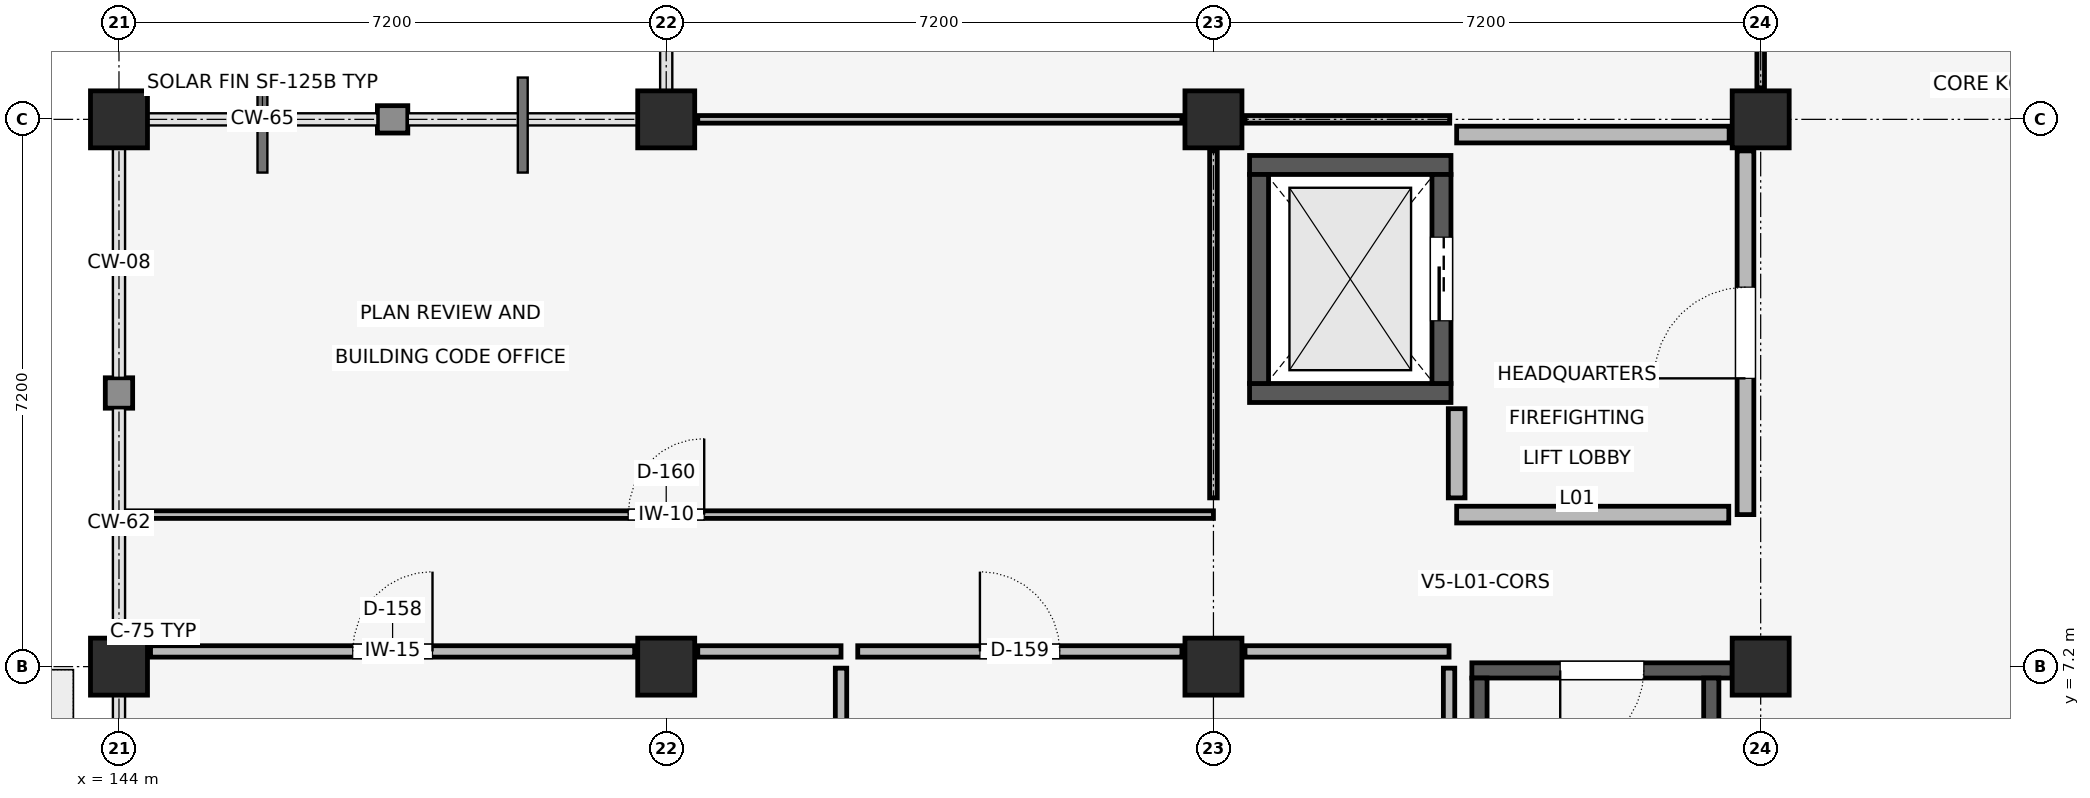
"""IFC4 building model, lengths in metres.
Left out: names, types, materials, properties, quantities, classifications, styles, units other than length and angle.
Written with IfcOpenShell. Run it as: python <this file> out.ifc"""

import sys

from ifc_helpers import new_model, si_unit, direction, frame, frame_2d, origin, origin_2d, place, context, subcontext, project, spatial, rectangle, extrude, element, fill, save


model = new_model("IFC4")
c1 = context("Model", 3, precision=1e-05, world=origin(), true_north=direction((0.0, 1.0)))
c2 = subcontext(c1, "Body", "Model", "MODEL_VIEW")
j1 = project(units=[si_unit("LENGTHUNIT", "METRE"), si_unit("PLANEANGLEUNIT", "RADIAN")], contexts=[c1])
p1 = place(None, origin())
s1 = spatial("IfcSite", under=j1, at=p1, CompositionType="ELEMENT")
p2 = place(p1, origin())
s2 = spatial("IfcBuilding", under=s1, at=p2, CompositionType="ELEMENT")
p3 = place(p2, frame((0.0, 0.0, 5.4)))
s3 = spatial("IfcBuildingStorey", under=s2, at=p3, CompositionType="ELEMENT", Elevation=5.4)
for number, where, z_axis, x_axis in (
    (1, (144.0, 7.2, 0.0), (0.0, 0.0, 1.0), (1.0, 0.0, 0.0)),
    (2, (144.0, 14.4, 0.0), (0.0, 0.0, 1.0), (1.0, 0.0, 0.0)),
    (3, (151.2, 7.2, 0.0), (0.0, 0.0, 1.0), (1.0, 0.0, 0.0)),
    (4, (151.2, 14.4, 0.0), (0.0, 0.0, 1.0), (1.0, 0.0, 0.0)),
    (5, (158.4, 7.2, 0.0), (0.0, 0.0, 1.0), (1.0, 0.0, 0.0)),
    (6, (158.4, 14.4, 0.0), (0.0, 0.0, 1.0), (1.0, 0.0, 0.0)),
    (7, (165.6, 7.2, 0.0), (0.0, 0.0, 1.0), (1.0, 0.0, 0.0)),
    (8, (165.6, 14.4, 0.0), (0.0, 0.0, 1.0), (1.0, 0.0, 0.0)),
):
    element("IfcColumn", number, at=place(p3, frame(where, z_axis=z_axis, x_axis=x_axis)), inside=s3, PredefinedType="COLUMN", context=c2, shape_type="SweptSolid", body=[
        extrude(rectangle(XDim=0.75, YDim=0.75, at=origin_2d()), origin(), (0.0, 0.0, 1.0), 4.2),
    ])
for number, where, z_axis, x_axis in (
    (9, (158.875, 10.8, 0.0), (0.0, 0.0, 1.0), (1.0, 0.0, 0.0)),
    (10, (158.875, 13.8, 0.0), (0.0, 0.0, 1.0), (1.0, 0.0, 0.0)),
):
    element("IfcWall", number, at=place(p3, frame(where, z_axis=z_axis, x_axis=x_axis)), inside=s3, PredefinedType="SHEAR", context=c2, shape_type="SweptSolid", body=[
        extrude(rectangle(XDim=2.65, YDim=0.25, at=frame_2d((1.325, 0.0))), origin(), (0.0, 0.0, 1.0), 3.95),
    ])
p4 = place(p3, frame((159.0, 10.925, 0.0), z_axis=(0.0, 0.0, 1.0), x_axis=(0.0, 1.0, 0.0)))
e11 = element("IfcWall", 11, at=p4, inside=s3, PredefinedType="SHEAR", context=c2, shape_type="SweptSolid", body=[
    extrude(rectangle(XDim=2.75, YDim=0.25, at=frame_2d((1.375, 0.0))), origin(), (0.0, 0.0, 1.0), 3.95),
])
p5 = place(p3, frame((161.4, 10.925, 0.0), z_axis=(0.0, 0.0, 1.0), x_axis=(0.0, 1.0, 0.0)))
e12 = element("IfcWall", 12, at=p5, inside=s3, PredefinedType="SHEAR", context=c2, shape_type="SweptSolid", body=[
    extrude(rectangle(XDim=2.75, YDim=0.25, at=frame_2d((1.375, 0.0))), origin(), (0.0, 0.0, 1.0), 3.95),
])
p6 = place(p5, frame((0.825, 0.0, 0.0)))
e13 = element("IfcOpeningElement", 13, at=p6, cuts=e12, PredefinedType="OPENING", context=c2, shape_type="SweptSolid", body=[
    extrude(rectangle(XDim=1.1, YDim=2.15, at=frame_2d((0.55, 1.075))), frame((0.0, 0.137, 0.0), z_axis=(0.0, -1.0, 0.0), x_axis=(1.0, 0.0, 0.0)), (0.0, 0.0, 1.0), 0.274),
])
p7 = place(p3, frame((161.8, 7.15, 0.0), z_axis=(0.0, 0.0, 1.0), x_axis=(1.0, 0.0, 0.0)))
e14 = element("IfcWall", 14, at=p7, inside=s3, PredefinedType="SHEAR", context=c2, shape_type="SweptSolid", body=[
    extrude(rectangle(XDim=3.425, YDim=0.2, at=frame_2d((1.712, 0.0))), origin(), (0.0, 0.0, 1.0), 3.95),
])
p8 = place(p7, frame((1.163, 0.0, 0.0)))
e15 = element("IfcOpeningElement", 15, at=p8, cuts=e14, PredefinedType="OPENING", context=c2, shape_type="SweptSolid", body=[
    extrude(rectangle(XDim=1.1, YDim=2.15, at=frame_2d((0.55, 1.075))), frame((0.0, 0.112, 0.0), z_axis=(0.0, -1.0, 0.0), x_axis=(1.0, 0.0, 0.0)), (0.0, 0.0, 1.0), 0.224),
])
for number, where, z_axis, x_axis in (
    (16, (161.9, 0.43, 0.0), (0.0, 0.0, 1.0), (0.0, 1.0, 0.0)),
    (17, (164.95, 0.43, 0.0), (0.0, 0.0, 1.0), (0.0, 1.0, 0.0)),
):
    element("IfcWall", number, at=place(p3, frame(where, z_axis=z_axis, x_axis=x_axis)), inside=s3, PredefinedType="SHEAR", context=c2, shape_type="SweptSolid", body=[
        extrude(rectangle(XDim=6.62, YDim=0.2, at=frame_2d((3.31, 0.0))), origin(), (0.0, 0.0, 1.0), 3.95),
    ])
p9 = place(p3, frame((144.0, 10.6, 0.0), z_axis=(0.0, 0.0, 1.0), x_axis=(0.0, 1.0, 0.0)))
e18 = element("IfcWall", 18, at=p9, inside=s3, PredefinedType="SOLIDWALL", context=c2, shape_type="SweptSolid", body=[
    extrude(rectangle(XDim=0.4, YDim=0.36, at=frame_2d((0.2, 0.0))), origin(), (0.0, 0.0, 1.0), 3.29),
])
p10 = place(p3, frame((147.4, 14.4, 0.0), z_axis=(0.0, 0.0, 1.0), x_axis=(1.0, 0.0, 0.0)))
e19 = element("IfcWall", 19, at=p10, inside=s3, PredefinedType="SOLIDWALL", context=c2, shape_type="SweptSolid", body=[
    extrude(rectangle(XDim=0.4, YDim=0.36, at=frame_2d((0.2, 0.0))), origin(), (0.0, 0.0, 1.0), 3.19),
])
p11 = place(p3, frame((165.4, 9.2, 0.0), z_axis=(0.0, 0.0, 1.0), x_axis=(0.0, 1.0, 0.0)))
e20 = element("IfcWall", 20, at=p11, inside=s3, PredefinedType="STANDARD", context=c2, shape_type="SweptSolid", body=[
    extrude(rectangle(XDim=4.785, YDim=0.22, at=frame_2d((2.393, 0.0))), origin(), (0.0, 0.0, 1.0), 3.288),
])
p12 = place(p11, frame((1.792, 0.0, 0.0)))
e21 = element("IfcOpeningElement", 21, at=p12, cuts=e20, PredefinedType="OPENING", context=c2, shape_type="SweptSolid", body=[
    extrude(rectangle(XDim=1.2, YDim=2.2, at=frame_2d((0.6, 1.1))), frame((0.0, 0.122, 0.0), z_axis=(0.0, -1.0, 0.0), x_axis=(1.0, 0.0, 0.0)), (0.0, 0.0, 1.0), 0.244),
])
p13 = place(p3, frame((161.6, 9.2, 0.0), z_axis=(0.0, 0.0, 1.0), x_axis=(1.0, 0.0, 0.0)))
e22 = element("IfcWall", 22, at=p13, inside=s3, PredefinedType="STANDARD", context=c2, shape_type="SweptSolid", body=[
    extrude(rectangle(XDim=3.58, YDim=0.22, at=frame_2d((1.79, 0.0))), origin(), (0.0, 0.0, 1.0), 3.92),
])
p14 = place(p3, frame((161.6, 14.2, 0.0), z_axis=(0.0, 0.0, 1.0), x_axis=(1.0, 0.0, 0.0)))
e23 = element("IfcWall", 23, at=p14, inside=s3, PredefinedType="STANDARD", context=c2, shape_type="SweptSolid", body=[
    extrude(rectangle(XDim=3.585, YDim=0.22, at=frame_2d((1.792, 0.0))), origin(), (0.0, 0.0, 1.0), 3.188),
])
p15 = place(p3, frame((161.6, 9.42, 0.0), z_axis=(0.0, 0.0, 1.0), x_axis=(0.0, 1.0, 0.0)))
e24 = element("IfcWall", 24, at=p15, inside=s3, PredefinedType="STANDARD", context=c2, shape_type="SweptSolid", body=[
    extrude(rectangle(XDim=1.174, YDim=0.22, at=frame_2d((0.587, 0.0))), origin(), (0.0, 0.0, 1.0), 3.92),
])
p16 = place(p3, frame((144.415, 7.4, 0.0), z_axis=(0.0, 0.0, 1.0), x_axis=(1.0, 0.0, 0.0)))
e25 = element("IfcWall", 25, at=p16, inside=s3, PredefinedType="STANDARD", context=c2, shape_type="SweptSolid", body=[
    extrude(rectangle(XDim=6.37, YDim=0.15, at=frame_2d((3.185, 0.0))), origin(), (0.0, 0.0, 1.0), 3.238),
])
p17 = place(p16, frame((2.66, 0.0, 0.0)))
e26 = element("IfcOpeningElement", 26, at=p17, cuts=e25, PredefinedType="OPENING", context=c2, shape_type="SweptSolid", body=[
    extrude(rectangle(XDim=1.05, YDim=2.15, at=frame_2d((0.525, 1.075))), frame((0.0, 0.087, 0.0), z_axis=(0.0, -1.0, 0.0), x_axis=(1.0, 0.0, 0.0)), (0.0, 0.0, 1.0), 0.174),
])
p18 = place(p3, frame((151.615, 7.4, 0.0), z_axis=(0.0, 0.0, 1.0), x_axis=(1.0, 0.0, 0.0)))
e27 = element("IfcWall", 27, at=p18, inside=s3, PredefinedType="STANDARD", context=c2, shape_type="SweptSolid", body=[
    extrude(rectangle(XDim=1.885, YDim=0.15, at=frame_2d((0.942, 0.0))), origin(), (0.0, 0.0, 1.0), 3.188),
])
p19 = place(p3, frame((153.5, 0.0, 0.0), z_axis=(0.0, 0.0, 1.0), x_axis=(0.0, 1.0, 0.0)))
e28 = element("IfcWall", 28, at=p19, inside=s3, PredefinedType="STANDARD", context=c2, shape_type="SweptSolid", body=[
    extrude(rectangle(XDim=7.18, YDim=0.15, at=frame_2d((3.59, 0.0))), origin(), (0.0, 0.0, 1.0), 3.188),
])
p20 = place(p3, frame((153.72, 7.4, 0.0), z_axis=(0.0, 0.0, 1.0), x_axis=(1.0, 0.0, 0.0)))
e29 = element("IfcWall", 29, at=p20, inside=s3, PredefinedType="STANDARD", context=c2, shape_type="SweptSolid", body=[
    extrude(rectangle(XDim=4.265, YDim=0.15, at=frame_2d((2.133, 0.0))), origin(), (0.0, 0.0, 1.0), 3.188),
])
p21 = place(p20, frame((1.607, 0.0, 0.0)))
e30 = element("IfcOpeningElement", 30, at=p21, cuts=e29, PredefinedType="OPENING", context=c2, shape_type="SweptSolid", body=[
    extrude(rectangle(XDim=1.05, YDim=2.15, at=frame_2d((0.525, 1.075))), frame((0.0, 0.087, 0.0), z_axis=(0.0, -1.0, 0.0), x_axis=(1.0, 0.0, 0.0)), (0.0, 0.0, 1.0), 0.174),
])
p22 = place(p3, frame((158.815, 7.4, 0.0), z_axis=(0.0, 0.0, 1.0), x_axis=(1.0, 0.0, 0.0)))
e31 = element("IfcWall", 31, at=p22, inside=s3, PredefinedType="STANDARD", context=c2, shape_type="SweptSolid", body=[
    extrude(rectangle(XDim=2.685, YDim=0.15, at=frame_2d((1.343, 0.0))), origin(), (0.0, 0.0, 1.0), 3.92),
])
p23 = place(p3, frame((161.5, 0.0, 0.0), z_axis=(0.0, 0.0, 1.0), x_axis=(0.0, 1.0, 0.0)))
e32 = element("IfcWall", 32, at=p23, inside=s3, PredefinedType="STANDARD", context=c2, shape_type="SweptSolid", body=[
    extrude(rectangle(XDim=7.18, YDim=0.15, at=frame_2d((3.59, 0.0))), origin(), (0.0, 0.0, 1.0), 3.288),
])
p24 = place(p3, frame((144.0, 9.2, 0.0), z_axis=(0.0, 0.0, 1.0), x_axis=(1.0, 0.0, 0.0)))
e33 = element("IfcWall", 33, at=p24, inside=s3, PredefinedType="PARTITIONING", context=c2, shape_type="SweptSolid", body=[
    extrude(rectangle(XDim=14.4, YDim=0.1, at=frame_2d((7.2, 0.0))), origin(), (0.0, 0.0, 1.0), 3.288),
])
p25 = place(p24, frame((6.7, 0.0, 0.0)))
e34 = element("IfcOpeningElement", 34, at=p25, cuts=e33, PredefinedType="OPENING", context=c2, shape_type="SweptSolid", body=[
    extrude(rectangle(XDim=1.0, YDim=2.15, at=frame_2d((0.5, 1.075))), frame((0.0, 0.062, 0.0), z_axis=(0.0, -1.0, 0.0), x_axis=(1.0, 0.0, 0.0)), (0.0, 0.0, 1.0), 0.124),
])
p26 = place(p3, frame((158.4, 9.42, 0.0), z_axis=(0.0, 0.0, 1.0), x_axis=(0.0, 1.0, 0.0)))
e35 = element("IfcWall", 35, at=p26, inside=s3, PredefinedType="PARTITIONING", context=c2, shape_type="SweptSolid", body=[
    extrude(rectangle(XDim=4.565, YDim=0.1, at=frame_2d((2.283, 0.0))), origin(), (0.0, 0.0, 1.0), 3.288),
])
p27 = place(p3, frame((165.6, 14.815, 0.0), z_axis=(0.0, 0.0, 1.0), x_axis=(0.0, 1.0, 0.0)))
e36 = element("IfcWall", 36, at=p27, inside=s3, PredefinedType="PARTITIONING", context=c2, shape_type="SweptSolid", body=[
    extrude(rectangle(XDim=6.37, YDim=0.1, at=frame_2d((3.185, 0.0))), origin(), (0.0, 0.0, 1.0), 3.338),
])
p28 = place(p27, frame((2.685, 0.0, 0.0)))
e37 = element("IfcOpeningElement", 37, at=p28, cuts=e36, PredefinedType="OPENING", context=c2, shape_type="SweptSolid", body=[
    extrude(rectangle(XDim=1.0, YDim=2.15, at=frame_2d((0.5, 1.075))), frame((0.0, 0.062, 0.0), z_axis=(0.0, -1.0, 0.0), x_axis=(1.0, 0.0, 0.0)), (0.0, 0.0, 1.0), 0.124),
])
p29 = place(p3, frame((151.615, 14.4, 0.0), z_axis=(0.0, 0.0, 1.0), x_axis=(1.0, 0.0, 0.0)))
e38 = element("IfcWall", 38, at=p29, inside=s3, PredefinedType="PARTITIONING", context=c2, shape_type="SweptSolid", body=[
    extrude(rectangle(XDim=6.37, YDim=0.1, at=frame_2d((3.185, 0.0))), origin(), (0.0, 0.0, 1.0), 3.238),
])
p30 = place(p3, frame((158.815, 14.4, 0.0), z_axis=(0.0, 0.0, 1.0), x_axis=(1.0, 0.0, 0.0)))
e39 = element("IfcWall", 39, at=p30, inside=s3, PredefinedType="PARTITIONING", context=c2, shape_type="SweptSolid", body=[
    extrude(rectangle(XDim=2.694, YDim=0.1, at=frame_2d((1.347, 0.0))), origin(), (0.0, 0.0, 1.0), 3.188),
])
p31 = place(p8, frame((1.1, 0.0, 0.0), z_axis=(0.0, 0.0, 1.0), x_axis=(-1.0, 0.0, 0.0)))
e40 = element("IfcDoor", 40, at=p31, inside=s3, OperationType="SINGLE_SWING_RIGHT", PredefinedType="DOOR", context=c2, shape_type="SweptSolid", body=[
    extrude(rectangle(XDim=1.1, YDim=2.15, at=frame_2d((0.55, 1.075))), frame((0.0, 0.025, 0.0), z_axis=(0.0, -1.0, 0.0), x_axis=(1.0, 0.0, 0.0)), (0.0, 0.0, 1.0), 0.05),
])
fill(e15, e40)
p32 = place(p6, origin())
e41 = element("IfcDoor", 41, at=p32, inside=s3, OperationType="SLIDING_TO_LEFT", PredefinedType="DOOR", context=c2, shape_type="SweptSolid", body=[
    extrude(rectangle(XDim=1.1, YDim=2.15, at=frame_2d((0.55, 1.075))), frame((0.0, 0.025, 0.0), z_axis=(0.0, -1.0, 0.0), x_axis=(1.0, 0.0, 0.0)), (0.0, 0.0, 1.0), 0.05),
])
fill(e13, e41)
p33 = place(p12, origin())
e42 = element("IfcDoor", 42, at=p33, inside=s3, OperationType="SINGLE_SWING_LEFT", PredefinedType="DOOR", context=c2, shape_type="SweptSolid", body=[
    extrude(rectangle(XDim=1.2, YDim=2.2, at=frame_2d((0.6, 1.1))), frame((0.0, 0.025, 0.0), z_axis=(0.0, -1.0, 0.0), x_axis=(1.0, 0.0, 0.0)), (0.0, 0.0, 1.0), 0.05),
])
fill(e21, e42)
p34 = place(p17, origin())
e43 = element("IfcDoor", 43, at=p34, inside=s3, OperationType="SINGLE_SWING_RIGHT", PredefinedType="DOOR", context=c2, shape_type="SweptSolid", body=[
    extrude(rectangle(XDim=1.05, YDim=2.15, at=frame_2d((0.525, 1.075))), frame((0.0, 0.025, 0.0), z_axis=(0.0, -1.0, 0.0), x_axis=(1.0, 0.0, 0.0)), (0.0, 0.0, 1.0), 0.05),
])
fill(e26, e43)
p35 = place(p21, origin())
e44 = element("IfcDoor", 44, at=p35, inside=s3, OperationType="SINGLE_SWING_LEFT", PredefinedType="DOOR", context=c2, shape_type="SweptSolid", body=[
    extrude(rectangle(XDim=1.05, YDim=2.15, at=frame_2d((0.525, 1.075))), frame((0.0, 0.025, 0.0), z_axis=(0.0, -1.0, 0.0), x_axis=(1.0, 0.0, 0.0)), (0.0, 0.0, 1.0), 0.05),
])
fill(e30, e44)
p36 = place(p25, origin())
e45 = element("IfcDoor", 45, at=p36, inside=s3, OperationType="SINGLE_SWING_RIGHT", PredefinedType="DOOR", context=c2, shape_type="SweptSolid", body=[
    extrude(rectangle(XDim=1.0, YDim=2.15, at=frame_2d((0.5, 1.075))), frame((0.0, 0.025, 0.0), z_axis=(0.0, -1.0, 0.0), x_axis=(1.0, 0.0, 0.0)), (0.0, 0.0, 1.0), 0.05),
])
fill(e34, e45)
save(model, sys.argv[1])
